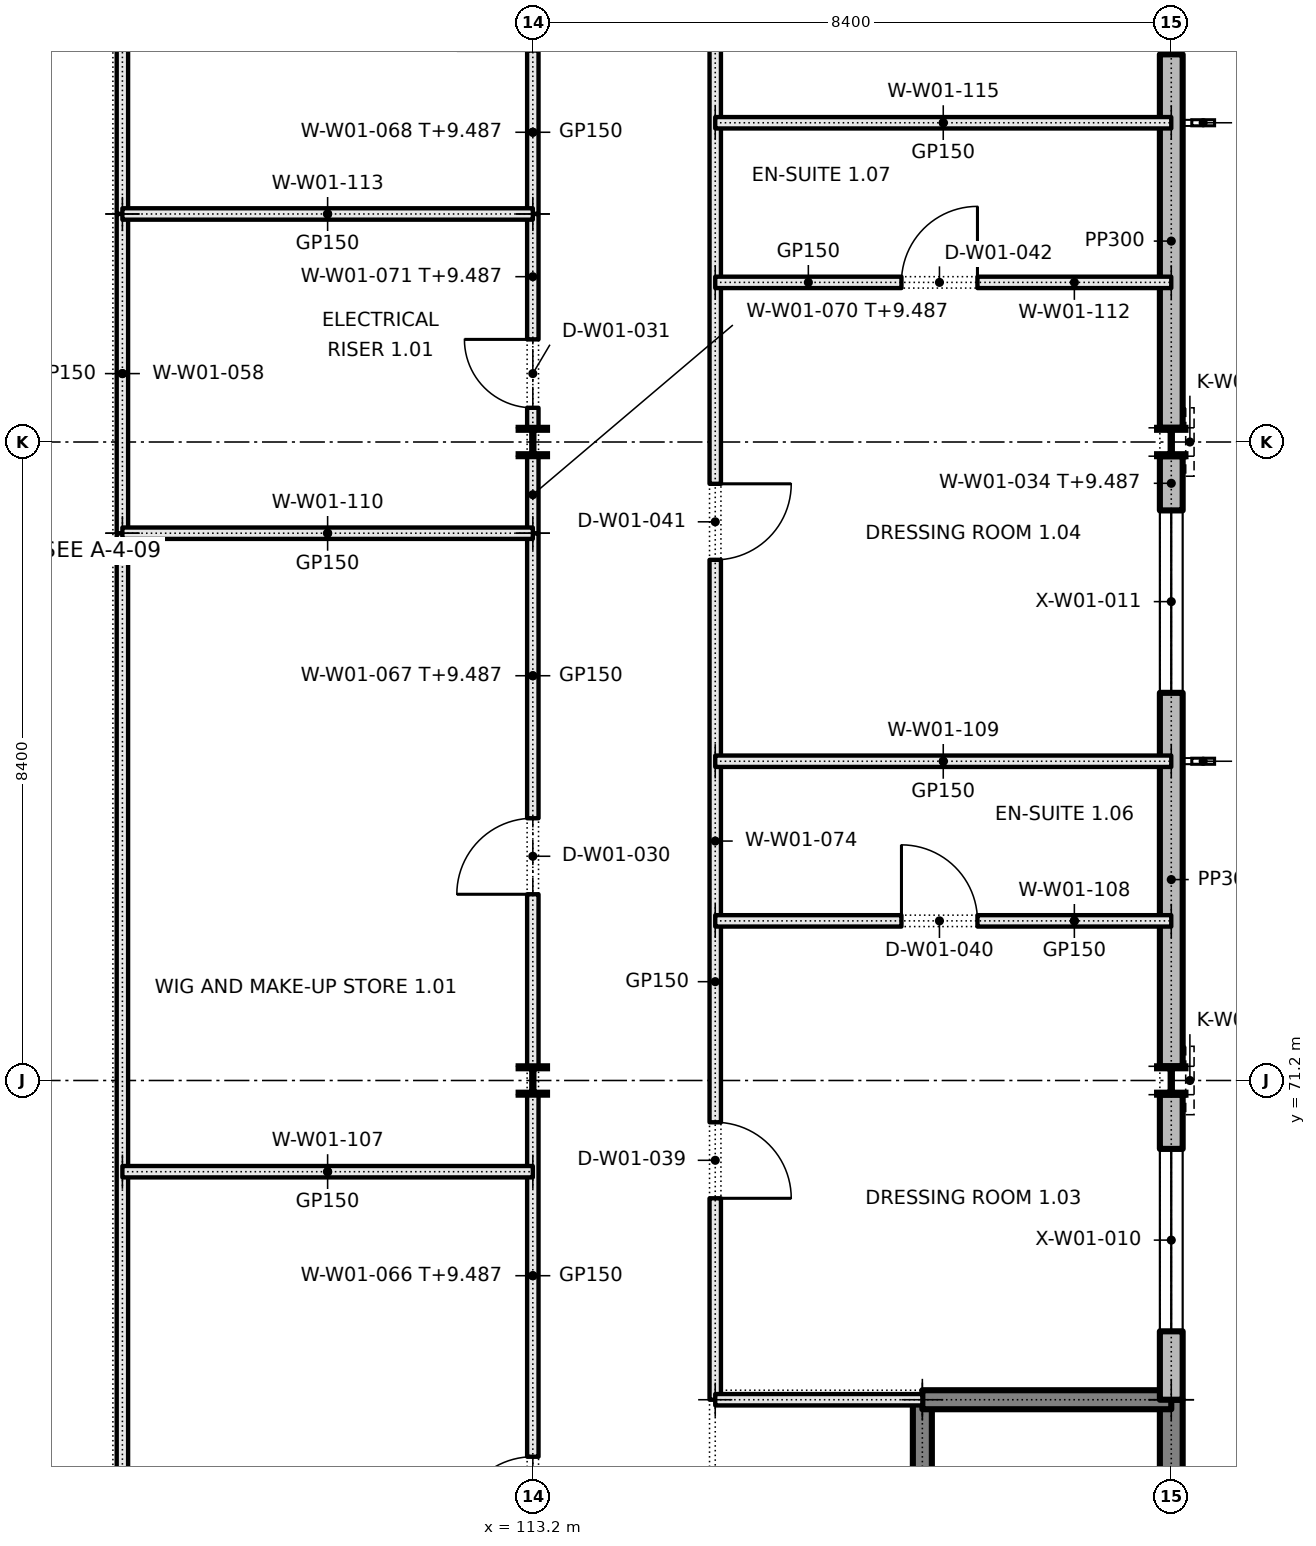
"""IFC4 building model, lengths in metres.
Left out: names, types, materials, properties, quantities, classifications, styles, units other than length and angle.
Written with IfcOpenShell. Run it as: python <this file> out.ifc"""

import sys

from ifc_helpers import new_model, si_unit, direction, frame, frame_2d, origin, origin_2d, place, context, subcontext, project, spatial, rectangle, i_section, extrude, element, fill, save


model = new_model("IFC4")
c1 = context("Model", 3, precision=1e-05, world=origin(), true_north=direction((0.0, 1.0)))
c2 = subcontext(c1, "Body", "Model", "MODEL_VIEW")
j1 = project(units=[si_unit("LENGTHUNIT", "METRE"), si_unit("PLANEANGLEUNIT", "RADIAN")], contexts=[c1])
p1 = place(None, origin())
s1 = spatial("IfcSite", under=j1, at=p1, CompositionType="ELEMENT")
p2 = place(p1, origin())
s2 = spatial("IfcBuilding", under=s1, at=p2, CompositionType="ELEMENT")
p3 = place(p2, frame((0.0, 0.0, 5.4)))
s3 = spatial("IfcBuildingStorey", under=s2, at=p3, CompositionType="ELEMENT", Elevation=5.4)
for number, where, z_axis, x_axis in (
    (1, (113.2, 71.2, 0.0), (0.0, 0.0, 1.0), (1.0, 0.0, 0.0)),
    (2, (113.2, 79.6, 0.0), (0.0, 0.0, 1.0), (1.0, 0.0, 0.0)),
    (3, (121.6, 71.2, 0.0), (0.0, 0.0, 1.0), (1.0, 0.0, 0.0)),
    (4, (121.6, 79.6, 0.0), (0.0, 0.0, 1.0), (1.0, 0.0, 0.0)),
):
    element("IfcColumn", number, at=place(p3, frame(where, z_axis=z_axis, x_axis=x_axis)), inside=s3, PredefinedType="COLUMN", context=c2, shape_type="SweptSolid", body=[
        extrude(i_section(OverallWidth=0.373, OverallDepth=0.373, WebThickness=0.016, FlangeThickness=0.026, FilletRadius=0.015, at=origin_2d()), origin(), (0.0, 0.0, 1.0), 4.8),
    ])
p4 = place(p3, frame((118.325, 58.6, 0.0), z_axis=(0.0, 0.0, 1.0), x_axis=(0.0, 1.0, 0.0)))
e5 = element("IfcWall", 5, at=p4, inside=s3, PredefinedType="SHEAR", context=c2, shape_type="SweptSolid", body=[
    extrude(rectangle(XDim=8.4, YDim=0.25, at=frame_2d((4.2, 0.0))), origin(), (0.0, 0.0, 1.0), 4.8),
])
p5 = place(p4, frame((0.675, 0.0, 0.0)))
e6 = element("IfcOpeningElement", 6, at=p5, cuts=e5, PredefinedType="OPENING", context=c2, shape_type="SweptSolid", body=[
    extrude(rectangle(XDim=1.2, YDim=2.1, at=frame_2d((0.6, 1.05))), frame((0.0, 0.135, 0.0), z_axis=(0.0, -1.0, 0.0), x_axis=(1.0, 0.0, 0.0)), (0.0, 0.0, 1.0), 0.27),
])
p6 = place(p3, frame((121.6, 62.987, 0.0), z_axis=(0.0, 0.0, 1.0), x_axis=(0.0, 1.0, 0.0)))
e7 = element("IfcWall", 7, at=p6, inside=s3, PredefinedType="SHEAR", context=c2, shape_type="SweptSolid", body=[
    extrude(rectangle(XDim=4.013, YDim=0.3, at=frame_2d((2.007, 0.0))), origin(), (0.0, 0.0, 1.0), 4.8),
])
p7 = place(p3, frame((118.325, 67.0, 0.0), z_axis=(0.0, 0.0, 1.0), x_axis=(1.0, 0.0, 0.0)))
e8 = element("IfcWall", 8, at=p7, inside=s3, PredefinedType="SHEAR", context=c2, shape_type="SweptSolid", body=[
    extrude(rectangle(XDim=3.275, YDim=0.25, at=frame_2d((1.638, 0.0))), origin(), (0.0, 0.0, 1.0), 4.8),
])
p8 = place(p3, frame((121.6, 67.0, 0.0), z_axis=(0.0, 0.0, 1.0), x_axis=(0.0, 1.0, 0.0)))
e9 = element("IfcWall", 9, at=p8, inside=s3, PredefinedType="SOLIDWALL", context=c2, shape_type="SweptSolid", body=[
    extrude(rectangle(XDim=4.013, YDim=0.3, at=frame_2d((2.007, 0.0))), origin(), (0.0, 0.0, 1.0), 4.087),
])
p9 = place(p8, frame((0.9, 0.0, 0.95)))
e10 = element("IfcOpeningElement", 10, at=p9, cuts=e9, PredefinedType="OPENING", context=c2, shape_type="SweptSolid", body=[
    extrude(rectangle(XDim=2.4, YDim=1.8, at=frame_2d((1.2, 0.9))), frame((0.0, 0.16, 0.0), z_axis=(0.0, -1.0, 0.0), x_axis=(1.0, 0.0, 0.0)), (0.0, 0.0, 1.0), 0.32),
])
p10 = place(p3, frame((121.6, 71.387, 0.0), z_axis=(0.0, 0.0, 1.0), x_axis=(0.0, 1.0, 0.0)))
e11 = element("IfcWall", 11, at=p10, inside=s3, PredefinedType="SOLIDWALL", context=c2, shape_type="SweptSolid", body=[
    extrude(rectangle(XDim=8.027, YDim=0.3, at=frame_2d((4.013, 0.0))), origin(), (0.0, 0.0, 1.0), 4.087),
])
p11 = place(p10, frame((4.913, 0.0, 0.95)))
e12 = element("IfcOpeningElement", 12, at=p11, cuts=e11, PredefinedType="OPENING", context=c2, shape_type="SweptSolid", body=[
    extrude(rectangle(XDim=2.4, YDim=1.8, at=frame_2d((1.2, 0.9))), frame((0.0, 0.16, 0.0), z_axis=(0.0, -1.0, 0.0), x_axis=(1.0, 0.0, 0.0)), (0.0, 0.0, 1.0), 0.32),
])
p12 = place(p3, frame((121.6, 79.787, 0.0), z_axis=(0.0, 0.0, 1.0), x_axis=(0.0, 1.0, 0.0)))
e13 = element("IfcWall", 13, at=p12, inside=s3, PredefinedType="SOLIDWALL", context=c2, shape_type="SweptSolid", body=[
    extrude(rectangle(XDim=8.027, YDim=0.3, at=frame_2d((4.013, 0.0))), origin(), (0.0, 0.0, 1.0), 4.087),
])
p13 = place(p12, frame((4.913, 0.0, 0.95)))
e14 = element("IfcOpeningElement", 14, at=p13, cuts=e13, PredefinedType="OPENING", context=c2, shape_type="SweptSolid", body=[
    extrude(rectangle(XDim=2.4, YDim=1.8, at=frame_2d((1.2, 0.9))), frame((0.0, 0.16, 0.0), z_axis=(0.0, -1.0, 0.0), x_axis=(1.0, 0.0, 0.0)), (0.0, 0.0, 1.0), 0.32),
])
p14 = place(p3, frame((107.8, 36.4, 0.0), z_axis=(0.0, 0.0, 1.0), x_axis=(0.0, 1.0, 0.0)))
e15 = element("IfcWall", 15, at=p14, inside=s3, PredefinedType="PARTITIONING", context=c2, shape_type="SweptSolid", body=[
    extrude(rectangle(XDim=42.0, YDim=0.15, at=frame_2d((21.0, 0.0))), origin(), (0.0, 0.0, 1.0), 4.8),
])
p15 = place(p3, frame((107.8, 82.6, 0.0), z_axis=(0.0, 0.0, 1.0), x_axis=(0.0, 1.0, 0.0)))
e16 = element("IfcWall", 16, at=p15, inside=s3, PredefinedType="PARTITIONING", context=c2, shape_type="SweptSolid", body=[
    extrude(rectangle(XDim=5.4, YDim=0.15, at=frame_2d((2.7, 0.0))), origin(), (0.0, 0.0, 1.0), 4.8),
])
p16 = place(p3, frame((107.8, 78.4, 0.0), z_axis=(0.0, 0.0, 1.0), x_axis=(0.0, 1.0, 0.0)))
e17 = element("IfcWall", 17, at=p16, inside=s3, PredefinedType="PARTITIONING", context=c2, shape_type="SweptSolid", body=[
    extrude(rectangle(XDim=4.2, YDim=0.15, at=frame_2d((2.1, 0.0))), origin(), (0.0, 0.0, 1.0), 4.8),
])
p17 = place(p3, frame((113.2, 62.987, 0.0), z_axis=(0.0, 0.0, 1.0), x_axis=(0.0, 1.0, 0.0)))
e18 = element("IfcWall", 18, at=p17, inside=s3, PredefinedType="PARTITIONING", context=c2, shape_type="SweptSolid", body=[
    extrude(rectangle(XDim=8.027, YDim=0.15, at=frame_2d((4.013, 0.0))), origin(), (0.0, 0.0, 1.0), 4.087),
])
p18 = place(p17, frame((2.263, 0.0, 0.0)))
e19 = element("IfcOpeningElement", 19, at=p18, cuts=e18, PredefinedType="OPENING", context=c2, shape_type="SweptSolid", body=[
    extrude(rectangle(XDim=1.0, YDim=2.1, at=frame_2d((0.5, 1.05))), frame((0.0, 0.085, 0.0), z_axis=(0.0, -1.0, 0.0), x_axis=(1.0, 0.0, 0.0)), (0.0, 0.0, 1.0), 0.17),
])
p19 = place(p3, frame((113.2, 71.387, 0.0), z_axis=(0.0, 0.0, 1.0), x_axis=(0.0, 1.0, 0.0)))
e20 = element("IfcWall", 20, at=p19, inside=s3, PredefinedType="PARTITIONING", context=c2, shape_type="SweptSolid", body=[
    extrude(rectangle(XDim=7.013, YDim=0.15, at=frame_2d((3.507, 0.0))), origin(), (0.0, 0.0, 1.0), 4.087),
])
p20 = place(p19, frame((2.263, 0.0, 0.0)))
e21 = element("IfcOpeningElement", 21, at=p20, cuts=e20, PredefinedType="OPENING", context=c2, shape_type="SweptSolid", body=[
    extrude(rectangle(XDim=1.0, YDim=2.1, at=frame_2d((0.5, 1.05))), frame((0.0, 0.085, 0.0), z_axis=(0.0, -1.0, 0.0), x_axis=(1.0, 0.0, 0.0)), (0.0, 0.0, 1.0), 0.17),
])
p21 = place(p3, frame((113.2, 82.6, 0.0), z_axis=(0.0, 0.0, 1.0), x_axis=(0.0, 1.0, 0.0)))
e22 = element("IfcWall", 22, at=p21, inside=s3, PredefinedType="PARTITIONING", context=c2, shape_type="SweptSolid", body=[
    extrude(rectangle(XDim=5.213, YDim=0.15, at=frame_2d((2.606, 0.0))), origin(), (0.0, 0.0, 1.0), 4.087),
])
p22 = place(p21, frame((2.15, 0.0, 0.0)))
e23 = element("IfcOpeningElement", 23, at=p22, cuts=e22, PredefinedType="OPENING", context=c2, shape_type="SweptSolid", body=[
    extrude(rectangle(XDim=1.0, YDim=2.1, at=frame_2d((0.5, 1.05))), frame((0.0, 0.085, 0.0), z_axis=(0.0, -1.0, 0.0), x_axis=(1.0, 0.0, 0.0)), (0.0, 0.0, 1.0), 0.17),
])
p23 = place(p3, frame((113.2, 78.4, 0.0), z_axis=(0.0, 0.0, 1.0), x_axis=(0.0, 1.0, 0.0)))
e24 = element("IfcWall", 24, at=p23, inside=s3, PredefinedType="PARTITIONING", context=c2, shape_type="SweptSolid", body=[
    extrude(rectangle(XDim=1.013, YDim=0.15, at=frame_2d((0.507, 0.0))), origin(), (0.0, 0.0, 1.0), 4.087),
])
p24 = place(p3, frame((113.2, 79.787, 0.0), z_axis=(0.0, 0.0, 1.0), x_axis=(0.0, 1.0, 0.0)))
e25 = element("IfcWall", 25, at=p24, inside=s3, PredefinedType="PARTITIONING", context=c2, shape_type="SweptSolid", body=[
    extrude(rectangle(XDim=2.813, YDim=0.15, at=frame_2d((1.407, 0.0))), origin(), (0.0, 0.0, 1.0), 4.087),
])
p25 = place(p24, frame((0.263, 0.0, 0.0)))
e26 = element("IfcOpeningElement", 26, at=p25, cuts=e25, PredefinedType="OPENING", context=c2, shape_type="SweptSolid", body=[
    extrude(rectangle(XDim=0.9, YDim=2.1, at=frame_2d((0.45, 1.05))), frame((0.0, 0.085, 0.0), z_axis=(0.0, -1.0, 0.0), x_axis=(1.0, 0.0, 0.0)), (0.0, 0.0, 1.0), 0.17),
])
p26 = place(p3, frame((115.6, 67.0, 0.0), z_axis=(0.0, 0.0, 1.0), x_axis=(0.0, 1.0, 0.0)))
e27 = element("IfcWall", 27, at=p26, inside=s3, PredefinedType="PARTITIONING", context=c2, shape_type="SweptSolid", body=[
    extrude(rectangle(XDim=21.0, YDim=0.15, at=frame_2d((10.5, 0.0))), origin(), (0.0, 0.0, 1.0), 4.8),
])
p27 = place(p26, frame((2.65, 0.0, 0.0)))
e28 = element("IfcOpeningElement", 28, at=p27, cuts=e27, PredefinedType="OPENING", context=c2, shape_type="SweptSolid", body=[
    extrude(rectangle(XDim=1.0, YDim=2.1, at=frame_2d((0.5, 1.05))), frame((0.0, 0.085, 0.0), z_axis=(0.0, -1.0, 0.0), x_axis=(1.0, 0.0, 0.0)), (0.0, 0.0, 1.0), 0.17),
])
p28 = place(p26, frame((11.05, 0.0, 0.0)))
e29 = element("IfcOpeningElement", 29, at=p28, cuts=e27, PredefinedType="OPENING", context=c2, shape_type="SweptSolid", body=[
    extrude(rectangle(XDim=1.0, YDim=2.1, at=frame_2d((0.5, 1.05))), frame((0.0, 0.085, 0.0), z_axis=(0.0, -1.0, 0.0), x_axis=(1.0, 0.0, 0.0)), (0.0, 0.0, 1.0), 0.17),
])
p29 = place(p26, frame((18.45, 0.0, 0.0)))
e30 = element("IfcOpeningElement", 30, at=p29, cuts=e27, PredefinedType="OPENING", context=c2, shape_type="SweptSolid", body=[
    extrude(rectangle(XDim=1.0, YDim=2.1, at=frame_2d((0.5, 1.05))), frame((0.0, 0.085, 0.0), z_axis=(0.0, -1.0, 0.0), x_axis=(1.0, 0.0, 0.0)), (0.0, 0.0, 1.0), 0.17),
])
p30 = place(p3, frame((115.6, 67.0, 0.0), z_axis=(0.0, 0.0, 1.0), x_axis=(1.0, 0.0, 0.0)))
e31 = element("IfcWall", 31, at=p30, inside=s3, PredefinedType="PARTITIONING", context=c2, shape_type="SweptSolid", body=[
    extrude(rectangle(XDim=2.725, YDim=0.15, at=frame_2d((1.362, 0.0))), origin(), (0.0, 0.0, 1.0), 4.8),
])
p31 = place(p3, frame((107.8, 70.0, 0.0), z_axis=(0.0, 0.0, 1.0), x_axis=(1.0, 0.0, 0.0)))
e32 = element("IfcWall", 32, at=p31, inside=s3, PredefinedType="PARTITIONING", context=c2, shape_type="SweptSolid", body=[
    extrude(rectangle(XDim=5.4, YDim=0.15, at=frame_2d((2.7, 0.0))), origin(), (0.0, 0.0, 1.0), 4.8),
])
p32 = place(p3, frame((115.6, 73.3, 0.0), z_axis=(0.0, 0.0, 1.0), x_axis=(1.0, 0.0, 0.0)))
e33 = element("IfcWall", 33, at=p32, inside=s3, PredefinedType="PARTITIONING", context=c2, shape_type="SweptSolid", body=[
    extrude(rectangle(XDim=6.0, YDim=0.15, at=frame_2d((3.0, 0.0))), origin(), (0.0, 0.0, 1.0), 4.8),
])
p33 = place(p32, frame((2.45, 0.0, 0.0)))
e34 = element("IfcOpeningElement", 34, at=p33, cuts=e33, PredefinedType="OPENING", context=c2, shape_type="SweptSolid", body=[
    extrude(rectangle(XDim=1.0, YDim=2.1, at=frame_2d((0.5, 1.05))), frame((0.0, 0.085, 0.0), z_axis=(0.0, -1.0, 0.0), x_axis=(1.0, 0.0, 0.0)), (0.0, 0.0, 1.0), 0.17),
])
p34 = place(p3, frame((115.6, 75.4, 0.0), z_axis=(0.0, 0.0, 1.0), x_axis=(1.0, 0.0, 0.0)))
e35 = element("IfcWall", 35, at=p34, inside=s3, PredefinedType="PARTITIONING", context=c2, shape_type="SweptSolid", body=[
    extrude(rectangle(XDim=6.0, YDim=0.15, at=frame_2d((3.0, 0.0))), origin(), (0.0, 0.0, 1.0), 4.8),
])
p35 = place(p3, frame((107.8, 78.4, 0.0), z_axis=(0.0, 0.0, 1.0), x_axis=(1.0, 0.0, 0.0)))
e36 = element("IfcWall", 36, at=p35, inside=s3, PredefinedType="PARTITIONING", context=c2, shape_type="SweptSolid", body=[
    extrude(rectangle(XDim=5.4, YDim=0.15, at=frame_2d((2.7, 0.0))), origin(), (0.0, 0.0, 1.0), 4.8),
])
p36 = place(p3, frame((115.6, 81.7, 0.0), z_axis=(0.0, 0.0, 1.0), x_axis=(1.0, 0.0, 0.0)))
e37 = element("IfcWall", 37, at=p36, inside=s3, PredefinedType="PARTITIONING", context=c2, shape_type="SweptSolid", body=[
    extrude(rectangle(XDim=6.0, YDim=0.15, at=frame_2d((3.0, 0.0))), origin(), (0.0, 0.0, 1.0), 4.8),
])
p37 = place(p36, frame((2.45, 0.0, 0.0)))
e38 = element("IfcOpeningElement", 38, at=p37, cuts=e37, PredefinedType="OPENING", context=c2, shape_type="SweptSolid", body=[
    extrude(rectangle(XDim=1.0, YDim=2.1, at=frame_2d((0.5, 1.05))), frame((0.0, 0.085, 0.0), z_axis=(0.0, -1.0, 0.0), x_axis=(1.0, 0.0, 0.0)), (0.0, 0.0, 1.0), 0.17),
])
p38 = place(p3, frame((107.8, 82.6, 0.0), z_axis=(0.0, 0.0, 1.0), x_axis=(1.0, 0.0, 0.0)))
e39 = element("IfcWall", 39, at=p38, inside=s3, PredefinedType="PARTITIONING", context=c2, shape_type="SweptSolid", body=[
    extrude(rectangle(XDim=5.4, YDim=0.15, at=frame_2d((2.7, 0.0))), origin(), (0.0, 0.0, 1.0), 4.8),
])
p39 = place(p3, frame((115.6, 83.8, 0.0), z_axis=(0.0, 0.0, 1.0), x_axis=(1.0, 0.0, 0.0)))
e40 = element("IfcWall", 40, at=p39, inside=s3, PredefinedType="PARTITIONING", context=c2, shape_type="SweptSolid", body=[
    extrude(rectangle(XDim=6.0, YDim=0.15, at=frame_2d((3.0, 0.0))), origin(), (0.0, 0.0, 1.0), 4.8),
])
p40 = place(p9, origin())
e41 = element("IfcWindow", 41, at=p40, inside=s3, PartitioningType="DOUBLE_PANEL_VERTICAL", PredefinedType="WINDOW", context=c2, shape_type="SweptSolid", body=[
    extrude(rectangle(XDim=2.4, YDim=1.8, at=frame_2d((1.2, 0.9))), frame((0.0, 0.03, 0.0), z_axis=(0.0, -1.0, 0.0), x_axis=(1.0, 0.0, 0.0)), (0.0, 0.0, 1.0), 0.06),
])
fill(e10, e41)
p41 = place(p11, origin())
e42 = element("IfcWindow", 42, at=p41, inside=s3, PartitioningType="DOUBLE_PANEL_VERTICAL", PredefinedType="WINDOW", context=c2, shape_type="SweptSolid", body=[
    extrude(rectangle(XDim=2.4, YDim=1.8, at=frame_2d((1.2, 0.9))), frame((0.0, 0.03, 0.0), z_axis=(0.0, -1.0, 0.0), x_axis=(1.0, 0.0, 0.0)), (0.0, 0.0, 1.0), 0.06),
])
fill(e12, e42)
p42 = place(p13, origin())
e43 = element("IfcWindow", 43, at=p42, inside=s3, PartitioningType="DOUBLE_PANEL_VERTICAL", PredefinedType="WINDOW", context=c2, shape_type="SweptSolid", body=[
    extrude(rectangle(XDim=2.4, YDim=1.8, at=frame_2d((1.2, 0.9))), frame((0.0, 0.03, 0.0), z_axis=(0.0, -1.0, 0.0), x_axis=(1.0, 0.0, 0.0)), (0.0, 0.0, 1.0), 0.06),
])
fill(e14, e43)
p43 = place(p18, origin())
e44 = element("IfcDoor", 44, at=p43, inside=s3, OperationType="SINGLE_SWING_LEFT", PredefinedType="DOOR", context=c2, shape_type="SweptSolid", body=[
    extrude(rectangle(XDim=1.0, YDim=2.1, at=frame_2d((0.5, 1.05))), frame((0.0, 0.025, 0.0), z_axis=(0.0, -1.0, 0.0), x_axis=(1.0, 0.0, 0.0)), (0.0, 0.0, 1.0), 0.05),
])
fill(e19, e44)
p44 = place(p20, origin())
e45 = element("IfcDoor", 45, at=p44, inside=s3, OperationType="SINGLE_SWING_LEFT", PredefinedType="DOOR", context=c2, shape_type="SweptSolid", body=[
    extrude(rectangle(XDim=1.0, YDim=2.1, at=frame_2d((0.5, 1.05))), frame((0.0, 0.025, 0.0), z_axis=(0.0, -1.0, 0.0), x_axis=(1.0, 0.0, 0.0)), (0.0, 0.0, 1.0), 0.05),
])
fill(e21, e45)
p45 = place(p25, origin())
e46 = element("IfcDoor", 46, at=p45, inside=s3, OperationType="SINGLE_SWING_RIGHT", PredefinedType="DOOR", context=c2, shape_type="SweptSolid", body=[
    extrude(rectangle(XDim=0.9, YDim=2.1, at=frame_2d((0.45, 1.05))), frame((0.0, 0.025, 0.0), z_axis=(0.0, -1.0, 0.0), x_axis=(1.0, 0.0, 0.0)), (0.0, 0.0, 1.0), 0.05),
])
fill(e26, e46)
p46 = place(p27, frame((1.0, 0.0, 0.0), z_axis=(0.0, 0.0, 1.0), x_axis=(-1.0, 0.0, 0.0)))
e47 = element("IfcDoor", 47, at=p46, inside=s3, OperationType="SINGLE_SWING_RIGHT", PredefinedType="DOOR", context=c2, shape_type="SweptSolid", body=[
    extrude(rectangle(XDim=1.0, YDim=2.1, at=frame_2d((0.5, 1.05))), frame((0.0, 0.025, 0.0), z_axis=(0.0, -1.0, 0.0), x_axis=(1.0, 0.0, 0.0)), (0.0, 0.0, 1.0), 0.05),
])
fill(e28, e47)
p47 = place(p33, origin())
e48 = element("IfcDoor", 48, at=p47, inside=s3, OperationType="SINGLE_SWING_LEFT", PredefinedType="DOOR", context=c2, shape_type="SweptSolid", body=[
    extrude(rectangle(XDim=1.0, YDim=2.1, at=frame_2d((0.5, 1.05))), frame((0.0, 0.025, 0.0), z_axis=(0.0, -1.0, 0.0), x_axis=(1.0, 0.0, 0.0)), (0.0, 0.0, 1.0), 0.05),
])
fill(e34, e48)
p48 = place(p28, frame((1.0, 0.0, 0.0), z_axis=(0.0, 0.0, 1.0), x_axis=(-1.0, 0.0, 0.0)))
e49 = element("IfcDoor", 49, at=p48, inside=s3, OperationType="SINGLE_SWING_LEFT", PredefinedType="DOOR", context=c2, shape_type="SweptSolid", body=[
    extrude(rectangle(XDim=1.0, YDim=2.1, at=frame_2d((0.5, 1.05))), frame((0.0, 0.025, 0.0), z_axis=(0.0, -1.0, 0.0), x_axis=(1.0, 0.0, 0.0)), (0.0, 0.0, 1.0), 0.05),
])
fill(e29, e49)
p49 = place(p37, origin())
e50 = element("IfcDoor", 50, at=p49, inside=s3, OperationType="SINGLE_SWING_RIGHT", PredefinedType="DOOR", context=c2, shape_type="SweptSolid", body=[
    extrude(rectangle(XDim=1.0, YDim=2.1, at=frame_2d((0.5, 1.05))), frame((0.0, 0.025, 0.0), z_axis=(0.0, -1.0, 0.0), x_axis=(1.0, 0.0, 0.0)), (0.0, 0.0, 1.0), 0.05),
])
fill(e38, e50)
save(model, sys.argv[1])
